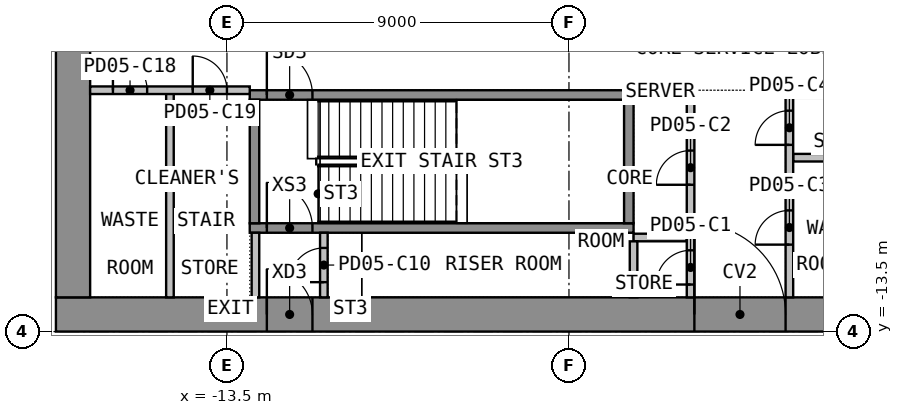
"""IFC4 building model, lengths in metres.
Left out: names, types, materials, properties, quantities, classifications, styles, units other than length and angle.
Written with IfcOpenShell. Run it as: python <this file> out.ifc"""

import sys

from ifc_helpers import new_model, si_unit, direction, frame, frame_2d, origin, place, context, subcontext, project, spatial, rectangle, extrude, element, fill, save


model = new_model("IFC4")
c1 = context("Model", 3, precision=1e-05, world=origin(), true_north=direction((0.0, 1.0)))
c2 = subcontext(c1, "Body", "Model", "MODEL_VIEW")
j1 = project(units=[si_unit("LENGTHUNIT", "METRE"), si_unit("PLANEANGLEUNIT", "RADIAN")], contexts=[c1])
p1 = place(None, origin())
s1 = spatial("IfcSite", under=j1, at=p1, CompositionType="ELEMENT")
p2 = place(p1, origin())
s2 = spatial("IfcBuilding", under=s1, at=p2, CompositionType="ELEMENT")
p3 = place(p2, frame((0.0, 0.0, 25.2)))
s3 = spatial("IfcBuildingStorey", under=s2, at=p3, CompositionType="ELEMENT", Elevation=25.2)
p4 = place(p3, frame((-18.0, -13.05, 0.0), z_axis=(0.0, 0.0, 1.0), x_axis=(1.0, 0.0, 0.0)))
e1 = element("IfcWall", 1, at=p4, inside=s3, PredefinedType="SHEAR", context=c2, shape_type="SweptSolid", body=[
    extrude(rectangle(XDim=36.0, YDim=0.9, at=frame_2d((18.0, 0.0))), origin(), (0.0, 0.0, 1.0), 4.425),
])
p5 = place(p4, frame((16.8, 0.0, 0.0)))
e2 = element("IfcOpeningElement", 2, at=p5, cuts=e1, PredefinedType="OPENING", context=c2, shape_type="SweptSolid", body=[
    extrude(rectangle(XDim=2.4, YDim=2.1, at=frame_2d((1.2, 1.05))), frame((0.0, 0.46, 0.0), z_axis=(0.0, -1.0, 0.0), x_axis=(1.0, 0.0, 0.0)), (0.0, 0.0, 1.0), 0.92),
])
p6 = place(p4, frame((5.55, 0.0, 0.0)))
e3 = element("IfcOpeningElement", 3, at=p6, cuts=e1, PredefinedType="OPENING", context=c2, shape_type="SweptSolid", body=[
    extrude(rectangle(XDim=1.2, YDim=2.1, at=frame_2d((0.6, 1.05))), frame((0.0, 0.46, 0.0), z_axis=(0.0, -1.0, 0.0), x_axis=(1.0, 0.0, 0.0)), (0.0, 0.0, 1.0), 0.92),
])
p7 = place(p4, frame((29.25, 0.0, 0.0)))
e4 = element("IfcOpeningElement", 4, at=p7, cuts=e1, PredefinedType="OPENING", context=c2, shape_type="SweptSolid", body=[
    extrude(rectangle(XDim=1.2, YDim=2.1, at=frame_2d((0.6, 1.05))), frame((0.0, 0.46, 0.0), z_axis=(0.0, -1.0, 0.0), x_axis=(1.0, 0.0, 0.0)), (0.0, 0.0, 1.0), 0.92),
])
p8 = place(p3, frame((-17.55, -12.6, 0.0), z_axis=(0.0, 0.0, 1.0), x_axis=(0.0, 1.0, 0.0)))
e5 = element("IfcWall", 5, at=p8, inside=s3, PredefinedType="SHEAR", context=c2, shape_type="SweptSolid", body=[
    extrude(rectangle(XDim=25.2, YDim=0.9, at=frame_2d((12.6, 0.0))), origin(), (0.0, 0.0, 1.0), 4.425),
])
p9 = place(p8, frame((11.4, 0.0, 0.0)))
e6 = element("IfcOpeningElement", 6, at=p9, cuts=e5, PredefinedType="OPENING", context=c2, shape_type="SweptSolid", body=[
    extrude(rectangle(XDim=2.4, YDim=2.1, at=frame_2d((1.2, 1.05))), frame((0.0, 0.46, 0.0), z_axis=(0.0, -1.0, 0.0), x_axis=(1.0, 0.0, 0.0)), (0.0, 0.0, 1.0), 0.92),
])
p10 = place(p3, frame((-12.9, -10.775, 0.0), z_axis=(0.0, 0.0, 1.0), x_axis=(1.0, 0.0, 0.0)))
e7 = element("IfcWall", 7, at=p10, inside=s3, PredefinedType="SHEAR", context=c2, shape_type="SweptSolid", body=[
    extrude(rectangle(XDim=10.1, YDim=0.25, at=frame_2d((5.05, 0.0))), origin(), (0.0, 0.0, 1.0), 4.425),
])
p11 = place(p10, frame((0.45, 0.0, 0.0)))
e8 = element("IfcOpeningElement", 8, at=p11, cuts=e7, PredefinedType="OPENING", context=c2, shape_type="SweptSolid", body=[
    extrude(rectangle(XDim=1.2, YDim=2.1, at=frame_2d((0.6, 1.05))), frame((0.0, 0.135, 0.0), z_axis=(0.0, -1.0, 0.0), x_axis=(1.0, 0.0, 0.0)), (0.0, 0.0, 1.0), 0.27),
])
p12 = place(p3, frame((-12.9, -7.275, 0.0), z_axis=(0.0, 0.0, 1.0), x_axis=(1.0, 0.0, 0.0)))
e9 = element("IfcWall", 9, at=p12, inside=s3, PredefinedType="SHEAR", context=c2, shape_type="SweptSolid", body=[
    extrude(rectangle(XDim=10.1, YDim=0.25, at=frame_2d((5.05, 0.0))), origin(), (0.0, 0.0, 1.0), 4.425),
])
p13 = place(p12, frame((0.45, 0.0, 0.0)))
e10 = element("IfcOpeningElement", 10, at=p13, cuts=e9, PredefinedType="OPENING", context=c2, shape_type="SweptSolid", body=[
    extrude(rectangle(XDim=1.2, YDim=2.1, at=frame_2d((0.6, 1.05))), frame((0.0, 0.135, 0.0), z_axis=(0.0, -1.0, 0.0), x_axis=(1.0, 0.0, 0.0)), (0.0, 0.0, 1.0), 0.27),
])
for number, where, z_axis, x_axis in (
    (11, (-12.775, -10.65, 0.0), (0.0, 0.0, 1.0), (0.0, 1.0, 0.0)),
    (12, (-2.925, -10.65, 0.0), (0.0, 0.0, 1.0), (0.0, 1.0, 0.0)),
):
    element("IfcWall", number, at=place(p3, frame(where, z_axis=z_axis, x_axis=x_axis)), inside=s3, PredefinedType="SHEAR", context=c2, shape_type="SweptSolid", body=[
        extrude(rectangle(XDim=3.25, YDim=0.25, at=frame_2d((1.625, 0.0))), origin(), (0.0, 0.0, 1.0), 4.425),
    ])
for number, where, z_axis, x_axis in (
    (13, (-2.8, -7.25, 0.0), (0.0, 0.0, 1.0), (1.0, 0.0, 0.0)),
    (14, (-2.8, -11.025, 0.0), (0.0, 0.0, 1.0), (1.0, 0.0, 0.0)),
    (15, (1.4, -7.25, 0.0), (0.0, 0.0, 1.0), (1.0, 0.0, 0.0)),
    (16, (1.4, -8.925, 0.0), (0.0, 0.0, 1.0), (1.0, 0.0, 0.0)),
):
    element("IfcWall", number, at=place(p3, frame(where, z_axis=z_axis, x_axis=x_axis)), inside=s3, PredefinedType="PARTITIONING", context=c2, shape_type="SweptSolid", body=[
        extrude(rectangle(XDim=1.4, YDim=0.2, at=frame_2d((0.7, 0.0))), origin(), (0.0, 0.0, 1.0), 4.425),
    ])
p14 = place(p3, frame((-1.3, -12.6, 0.0), z_axis=(0.0, 0.0, 1.0), x_axis=(0.0, 1.0, 0.0)))
e17 = element("IfcWall", 17, at=p14, inside=s3, PredefinedType="PARTITIONING", context=c2, shape_type="SweptSolid", body=[
    extrude(rectangle(XDim=5.45, YDim=0.2, at=frame_2d((2.725, 0.0))), origin(), (0.0, 0.0, 1.0), 4.425),
])
p15 = place(p14, frame((0.337, 0.0, 0.0)))
e18 = element("IfcOpeningElement", 18, at=p15, cuts=e17, PredefinedType="OPENING", context=c2, shape_type="SweptSolid", body=[
    extrude(rectangle(XDim=0.9, YDim=2.1, at=frame_2d((0.45, 1.05))), frame((0.0, 0.11, 0.0), z_axis=(0.0, -1.0, 0.0), x_axis=(1.0, 0.0, 0.0)), (0.0, 0.0, 1.0), 0.22),
])
p16 = place(p14, frame((2.962, 0.0, 0.0)))
e19 = element("IfcOpeningElement", 19, at=p16, cuts=e17, PredefinedType="OPENING", context=c2, shape_type="SweptSolid", body=[
    extrude(rectangle(XDim=0.9, YDim=2.1, at=frame_2d((0.45, 1.05))), frame((0.0, 0.11, 0.0), z_axis=(0.0, -1.0, 0.0), x_axis=(1.0, 0.0, 0.0)), (0.0, 0.0, 1.0), 0.22),
])
p17 = place(p3, frame((1.3, -12.6, 0.0), z_axis=(0.0, 0.0, 1.0), x_axis=(0.0, 1.0, 0.0)))
e20 = element("IfcWall", 20, at=p17, inside=s3, PredefinedType="PARTITIONING", context=c2, shape_type="SweptSolid", body=[
    extrude(rectangle(XDim=5.45, YDim=0.2, at=frame_2d((2.725, 0.0))), origin(), (0.0, 0.0, 1.0), 4.425),
])
p18 = place(p17, frame((1.387, 0.0, 0.0)))
e21 = element("IfcOpeningElement", 21, at=p18, cuts=e20, PredefinedType="OPENING", context=c2, shape_type="SweptSolid", body=[
    extrude(rectangle(XDim=0.9, YDim=2.1, at=frame_2d((0.45, 1.05))), frame((0.0, 0.11, 0.0), z_axis=(0.0, -1.0, 0.0), x_axis=(1.0, 0.0, 0.0)), (0.0, 0.0, 1.0), 0.22),
])
p19 = place(p17, frame((4.012, 0.0, 0.0)))
e22 = element("IfcOpeningElement", 22, at=p19, cuts=e20, PredefinedType="OPENING", context=c2, shape_type="SweptSolid", body=[
    extrude(rectangle(XDim=0.9, YDim=2.1, at=frame_2d((0.45, 1.05))), frame((0.0, 0.11, 0.0), z_axis=(0.0, -1.0, 0.0), x_axis=(1.0, 0.0, 0.0)), (0.0, 0.0, 1.0), 0.22),
])
p20 = place(p3, frame((-12.75, -12.6, 0.0), z_axis=(0.0, 0.0, 1.0), x_axis=(0.0, 1.0, 0.0)))
e23 = element("IfcWall", 23, at=p20, inside=s3, PredefinedType="PARTITIONING", context=c2, shape_type="SweptSolid", body=[
    extrude(rectangle(XDim=1.7, YDim=0.2, at=frame_2d((0.85, 0.0))), origin(), (0.0, 0.0, 1.0), 4.425),
])
p21 = place(p3, frame((-10.95, -12.6, 0.0), z_axis=(0.0, 0.0, 1.0), x_axis=(0.0, 1.0, 0.0)))
e24 = element("IfcWall", 24, at=p21, inside=s3, PredefinedType="PARTITIONING", context=c2, shape_type="SweptSolid", body=[
    extrude(rectangle(XDim=1.7, YDim=0.2, at=frame_2d((0.85, 0.0))), origin(), (0.0, 0.0, 1.0), 4.425),
])
p22 = place(p21, frame((0.4, 0.0, 0.0)))
e25 = element("IfcOpeningElement", 25, at=p22, cuts=e24, PredefinedType="OPENING", context=c2, shape_type="SweptSolid", body=[
    extrude(rectangle(XDim=0.9, YDim=2.1, at=frame_2d((0.45, 1.05))), frame((0.0, 0.11, 0.0), z_axis=(0.0, -1.0, 0.0), x_axis=(1.0, 0.0, 0.0)), (0.0, 0.0, 1.0), 0.22),
])
p23 = place(p3, frame((-15.0, -12.6, 0.0), z_axis=(0.0, 0.0, 1.0), x_axis=(0.0, 1.0, 0.0)))
e26 = element("IfcWall", 26, at=p23, inside=s3, PredefinedType="PARTITIONING", context=c2, shape_type="SweptSolid", body=[
    extrude(rectangle(XDim=5.45, YDim=0.2, at=frame_2d((2.725, 0.0))), origin(), (0.0, 0.0, 1.0), 4.425),
])
p24 = place(p3, frame((-17.1, -7.15, 0.0), z_axis=(0.0, 0.0, 1.0), x_axis=(1.0, 0.0, 0.0)))
e27 = element("IfcWall", 27, at=p24, inside=s3, PredefinedType="PARTITIONING", context=c2, shape_type="SweptSolid", body=[
    extrude(rectangle(XDim=4.2, YDim=0.2, at=frame_2d((2.1, 0.0))), origin(), (0.0, 0.0, 1.0), 4.425),
])
p25 = place(p24, frame((0.6, 0.0, 0.0)))
e28 = element("IfcOpeningElement", 28, at=p25, cuts=e27, PredefinedType="OPENING", context=c2, shape_type="SweptSolid", body=[
    extrude(rectangle(XDim=0.9, YDim=2.1, at=frame_2d((0.45, 1.05))), frame((0.0, 0.11, 0.0), z_axis=(0.0, -1.0, 0.0), x_axis=(1.0, 0.0, 0.0)), (0.0, 0.0, 1.0), 0.22),
])
p26 = place(p24, frame((2.7, 0.0, 0.0)))
e29 = element("IfcOpeningElement", 29, at=p26, cuts=e27, PredefinedType="OPENING", context=c2, shape_type="SweptSolid", body=[
    extrude(rectangle(XDim=0.9, YDim=2.1, at=frame_2d((0.45, 1.05))), frame((0.0, 0.11, 0.0), z_axis=(0.0, -1.0, 0.0), x_axis=(1.0, 0.0, 0.0)), (0.0, 0.0, 1.0), 0.22),
])
p27 = place(p3, frame((-2.8, -12.599, 0.0), z_axis=(0.0, 0.0, 1.0), x_axis=(0.0, 1.0, 0.0)))
e30 = element("IfcWall", 30, at=p27, inside=s3, PredefinedType="PARTITIONING", context=c2, shape_type="SweptSolid", body=[
    extrude(rectangle(XDim=1.473, YDim=0.2, at=frame_2d((0.737, 0.0))), origin(), (0.0, 0.0, 1.0), 4.425),
])
p28 = place(p5, origin())
e31 = element("IfcDoor", 31, at=p28, inside=s3, OperationType="DOUBLE_DOOR_DOUBLE_SWING", PredefinedType="DOOR", context=c2, shape_type="SweptSolid", body=[
    extrude(rectangle(XDim=2.4, YDim=2.1, at=frame_2d((1.2, 1.05))), frame((0.0, 0.025, 0.0), z_axis=(0.0, -1.0, 0.0), x_axis=(1.0, 0.0, 0.0)), (0.0, 0.0, 1.0), 0.05),
])
fill(e2, e31)
p29 = place(p6, origin())
e32 = element("IfcDoor", 32, at=p29, inside=s3, OperationType="SINGLE_SWING_RIGHT", PredefinedType="DOOR", context=c2, shape_type="SweptSolid", body=[
    extrude(rectangle(XDim=1.2, YDim=2.1, at=frame_2d((0.6, 1.05))), frame((0.0, 0.025, 0.0), z_axis=(0.0, -1.0, 0.0), x_axis=(1.0, 0.0, 0.0)), (0.0, 0.0, 1.0), 0.05),
])
fill(e3, e32)
p30 = place(p13, origin())
e33 = element("IfcDoor", 33, at=p30, inside=s3, OperationType="SINGLE_SWING_LEFT", PredefinedType="DOOR", context=c2, shape_type="SweptSolid", body=[
    extrude(rectangle(XDim=1.2, YDim=2.1, at=frame_2d((0.6, 1.05))), frame((0.0, 0.025, 0.0), z_axis=(0.0, -1.0, 0.0), x_axis=(1.0, 0.0, 0.0)), (0.0, 0.0, 1.0), 0.05),
])
fill(e10, e33)
p31 = place(p15, origin())
e34 = element("IfcDoor", 34, at=p31, inside=s3, OperationType="SINGLE_SWING_LEFT", PredefinedType="DOOR", context=c2, shape_type="SweptSolid", body=[
    extrude(rectangle(XDim=0.9, YDim=2.1, at=frame_2d((0.45, 1.05))), frame((0.0, 0.025, 0.0), z_axis=(0.0, -1.0, 0.0), x_axis=(1.0, 0.0, 0.0)), (0.0, 0.0, 1.0), 0.05),
])
fill(e18, e34)
p32 = place(p16, origin())
e35 = element("IfcDoor", 35, at=p32, inside=s3, OperationType="SINGLE_SWING_LEFT", PredefinedType="DOOR", context=c2, shape_type="SweptSolid", body=[
    extrude(rectangle(XDim=0.9, YDim=2.1, at=frame_2d((0.45, 1.05))), frame((0.0, 0.025, 0.0), z_axis=(0.0, -1.0, 0.0), x_axis=(1.0, 0.0, 0.0)), (0.0, 0.0, 1.0), 0.05),
])
fill(e19, e35)
p33 = place(p18, origin())
e36 = element("IfcDoor", 36, at=p33, inside=s3, OperationType="SINGLE_SWING_LEFT", PredefinedType="DOOR", context=c2, shape_type="SweptSolid", body=[
    extrude(rectangle(XDim=0.9, YDim=2.1, at=frame_2d((0.45, 1.05))), frame((0.0, 0.025, 0.0), z_axis=(0.0, -1.0, 0.0), x_axis=(1.0, 0.0, 0.0)), (0.0, 0.0, 1.0), 0.05),
])
fill(e21, e36)
p34 = place(p19, origin())
e37 = element("IfcDoor", 37, at=p34, inside=s3, OperationType="SINGLE_SWING_LEFT", PredefinedType="DOOR", context=c2, shape_type="SweptSolid", body=[
    extrude(rectangle(XDim=0.9, YDim=2.1, at=frame_2d((0.45, 1.05))), frame((0.0, 0.025, 0.0), z_axis=(0.0, -1.0, 0.0), x_axis=(1.0, 0.0, 0.0)), (0.0, 0.0, 1.0), 0.05),
])
fill(e22, e37)
p35 = place(p11, origin())
e38 = element("IfcDoor", 38, at=p35, inside=s3, OperationType="SINGLE_SWING_RIGHT", PredefinedType="DOOR", context=c2, shape_type="SweptSolid", body=[
    extrude(rectangle(XDim=1.2, YDim=2.1, at=frame_2d((0.6, 1.05))), frame((0.0, 0.025, 0.0), z_axis=(0.0, -1.0, 0.0), x_axis=(1.0, 0.0, 0.0)), (0.0, 0.0, 1.0), 0.05),
])
fill(e8, e38)
p36 = place(p22, origin())
e39 = element("IfcDoor", 39, at=p36, inside=s3, OperationType="SINGLE_SWING_LEFT", PredefinedType="DOOR", context=c2, shape_type="SweptSolid", body=[
    extrude(rectangle(XDim=0.9, YDim=2.1, at=frame_2d((0.45, 1.05))), frame((0.0, 0.025, 0.0), z_axis=(0.0, -1.0, 0.0), x_axis=(1.0, 0.0, 0.0)), (0.0, 0.0, 1.0), 0.05),
])
fill(e25, e39)
p37 = place(p25, origin())
e40 = element("IfcDoor", 40, at=p37, inside=s3, OperationType="SINGLE_SWING_LEFT", PredefinedType="DOOR", context=c2, shape_type="SweptSolid", body=[
    extrude(rectangle(XDim=0.9, YDim=2.1, at=frame_2d((0.45, 1.05))), frame((0.0, 0.025, 0.0), z_axis=(0.0, -1.0, 0.0), x_axis=(1.0, 0.0, 0.0)), (0.0, 0.0, 1.0), 0.05),
])
fill(e28, e40)
p38 = place(p26, origin())
e41 = element("IfcDoor", 41, at=p38, inside=s3, OperationType="SINGLE_SWING_LEFT", PredefinedType="DOOR", context=c2, shape_type="SweptSolid", body=[
    extrude(rectangle(XDim=0.9, YDim=2.1, at=frame_2d((0.45, 1.05))), frame((0.0, 0.025, 0.0), z_axis=(0.0, -1.0, 0.0), x_axis=(1.0, 0.0, 0.0)), (0.0, 0.0, 1.0), 0.05),
])
fill(e29, e41)
save(model, sys.argv[1])
